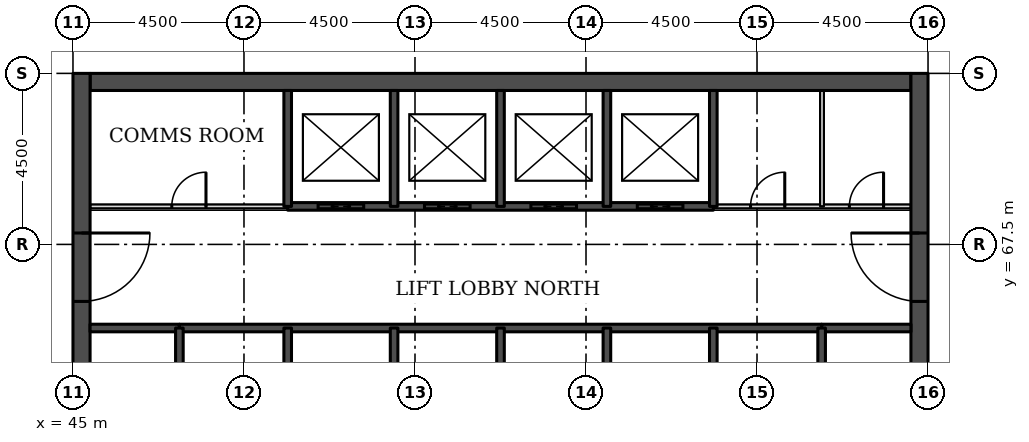
"""IFC4 building model, lengths in metres.
Left out: names, types, materials, properties, quantities, classifications, styles, units other than length and angle.
Written with IfcOpenShell. Run it as: python <this file> out.ifc"""

import sys

from ifc_helpers import new_model, si_unit, direction, frame, frame_2d, origin, place, context, subcontext, project, spatial, rectangle, extrude, element, fill, save


model = new_model("IFC4")
c1 = context("Model", 3, precision=1e-05, world=origin(), true_north=direction((0.0, 1.0)))
c2 = subcontext(c1, "Body", "Model", "MODEL_VIEW")
j1 = project(units=[si_unit("LENGTHUNIT", "METRE"), si_unit("PLANEANGLEUNIT", "RADIAN")], contexts=[c1])
p1 = place(None, origin())
s1 = spatial("IfcSite", under=j1, at=p1, CompositionType="ELEMENT")
p2 = place(p1, origin())
s2 = spatial("IfcBuilding", under=s1, at=p2, CompositionType="ELEMENT")
p3 = place(p2, frame((0.0, 0.0, 86.3)))
s3 = spatial("IfcBuildingStorey", under=s2, at=p3, CompositionType="ELEMENT", Elevation=86.3)
p4 = place(p3, frame((45.45, 71.775, 0.0), z_axis=(0.0, 0.0, 1.0), x_axis=(1.0, 0.0, 0.0)))
e1 = element("IfcWall", 1, at=p4, inside=s3, PredefinedType="SHEAR", context=c2, shape_type="SweptSolid", body=[
    extrude(rectangle(XDim=21.6, YDim=0.45, at=frame_2d((10.8, 0.0))), origin(), (0.0, 0.0, 1.0), 3.7),
])
p5 = place(p3, frame((45.225, 49.5, 0.0), z_axis=(0.0, 0.0, 1.0), x_axis=(0.0, 1.0, 0.0)))
e2 = element("IfcWall", 2, at=p5, inside=s3, PredefinedType="SHEAR", context=c2, shape_type="SweptSolid", body=[
    extrude(rectangle(XDim=22.5, YDim=0.45, at=frame_2d((11.25, 0.0))), origin(), (0.0, 0.0, 1.0), 3.7),
])
p6 = place(p5, frame((4.2, 0.0, 0.0)))
e3 = element("IfcOpeningElement", 3, at=p6, cuts=e2, PredefinedType="OPENING", context=c2, shape_type="SweptSolid", body=[
    extrude(rectangle(XDim=1.8, YDim=2.1, at=frame_2d((0.9, 1.05))), frame((0.0, 0.235, 0.0), z_axis=(0.0, -1.0, 0.0), x_axis=(1.0, 0.0, 0.0)), (0.0, 0.0, 1.0), 0.47),
])
p7 = place(p5, frame((6.9, 0.0, 0.0)))
e4 = element("IfcOpeningElement", 4, at=p7, cuts=e2, PredefinedType="OPENING", context=c2, shape_type="SweptSolid", body=[
    extrude(rectangle(XDim=1.1, YDim=2.1, at=frame_2d((0.55, 1.05))), frame((0.0, 0.235, 0.0), z_axis=(0.0, -1.0, 0.0), x_axis=(1.0, 0.0, 0.0)), (0.0, 0.0, 1.0), 0.47),
])
p8 = place(p5, frame((13.6, 0.0, 0.0)))
e5 = element("IfcOpeningElement", 5, at=p8, cuts=e2, PredefinedType="OPENING", context=c2, shape_type="SweptSolid", body=[
    extrude(rectangle(XDim=1.1, YDim=2.1, at=frame_2d((0.55, 1.05))), frame((0.0, 0.235, 0.0), z_axis=(0.0, -1.0, 0.0), x_axis=(1.0, 0.0, 0.0)), (0.0, 0.0, 1.0), 0.47),
])
p9 = place(p5, frame((16.5, 0.0, 0.0)))
e6 = element("IfcOpeningElement", 6, at=p9, cuts=e2, PredefinedType="OPENING", context=c2, shape_type="SweptSolid", body=[
    extrude(rectangle(XDim=1.8, YDim=2.1, at=frame_2d((0.9, 1.05))), frame((0.0, 0.235, 0.0), z_axis=(0.0, -1.0, 0.0), x_axis=(1.0, 0.0, 0.0)), (0.0, 0.0, 1.0), 0.47),
])
p10 = place(p3, frame((67.275, 49.5, 0.0), z_axis=(0.0, 0.0, 1.0), x_axis=(0.0, 1.0, 0.0)))
e7 = element("IfcWall", 7, at=p10, inside=s3, PredefinedType="SHEAR", context=c2, shape_type="SweptSolid", body=[
    extrude(rectangle(XDim=22.5, YDim=0.45, at=frame_2d((11.25, 0.0))), origin(), (0.0, 0.0, 1.0), 3.7),
])
p11 = place(p10, frame((4.2, 0.0, 0.0)))
e8 = element("IfcOpeningElement", 8, at=p11, cuts=e7, PredefinedType="OPENING", context=c2, shape_type="SweptSolid", body=[
    extrude(rectangle(XDim=1.8, YDim=2.1, at=frame_2d((0.9, 1.05))), frame((0.0, 0.235, 0.0), z_axis=(0.0, -1.0, 0.0), x_axis=(1.0, 0.0, 0.0)), (0.0, 0.0, 1.0), 0.47),
])
p12 = place(p10, frame((6.9, 0.0, 0.0)))
e9 = element("IfcOpeningElement", 9, at=p12, cuts=e7, PredefinedType="OPENING", context=c2, shape_type="SweptSolid", body=[
    extrude(rectangle(XDim=1.1, YDim=2.1, at=frame_2d((0.55, 1.05))), frame((0.0, 0.235, 0.0), z_axis=(0.0, -1.0, 0.0), x_axis=(1.0, 0.0, 0.0)), (0.0, 0.0, 1.0), 0.47),
])
p13 = place(p10, frame((13.6, 0.0, 0.0)))
e10 = element("IfcOpeningElement", 10, at=p13, cuts=e7, PredefinedType="OPENING", context=c2, shape_type="SweptSolid", body=[
    extrude(rectangle(XDim=1.1, YDim=2.1, at=frame_2d((0.55, 1.05))), frame((0.0, 0.235, 0.0), z_axis=(0.0, -1.0, 0.0), x_axis=(1.0, 0.0, 0.0)), (0.0, 0.0, 1.0), 0.47),
])
p14 = place(p10, frame((16.5, 0.0, 0.0)))
e11 = element("IfcOpeningElement", 11, at=p14, cuts=e7, PredefinedType="OPENING", context=c2, shape_type="SweptSolid", body=[
    extrude(rectangle(XDim=1.8, YDim=2.1, at=frame_2d((0.9, 1.05))), frame((0.0, 0.235, 0.0), z_axis=(0.0, -1.0, 0.0), x_axis=(1.0, 0.0, 0.0)), (0.0, 0.0, 1.0), 0.47),
])
for number, where, z_axis, x_axis in (
    (12, (45.45, 65.3, 0.0), (0.0, 0.0, 1.0), (1.0, 0.0, 0.0)),
    (13, (64.7, 65.3, 0.0), (0.0, 0.0, 1.0), (1.0, 0.0, 0.0)),
):
    element("IfcWall", number, at=place(p3, frame(where, z_axis=z_axis, x_axis=x_axis)), inside=s3, PredefinedType="SOLIDWALL", context=c2, shape_type="SweptSolid", body=[
        extrude(rectangle(XDim=2.35, YDim=0.2, at=frame_2d((1.175, 0.0))), origin(), (0.0, 0.0, 1.0), 3.55),
    ])
p15 = place(p3, frame((47.8, 65.3, 0.0), z_axis=(0.0, 0.0, 1.0), x_axis=(1.0, 0.0, 0.0)))
e14 = element("IfcWall", 14, at=p15, inside=s3, PredefinedType="SOLIDWALL", context=c2, shape_type="SweptSolid", body=[
    extrude(rectangle(XDim=16.9, YDim=0.2, at=frame_2d((8.45, 0.0))), origin(), (0.0, 0.0, 1.0), 3.55),
])
p16 = place(p3, frame((45.45, 68.5, 0.0), z_axis=(0.0, 0.0, 1.0), x_axis=(1.0, 0.0, 0.0)))
e15 = element("IfcWall", 15, at=p16, inside=s3, PredefinedType="PARTITIONING", context=c2, shape_type="SweptSolid", body=[
    extrude(rectangle(XDim=5.2, YDim=0.1, at=frame_2d((2.6, 0.0))), origin(), (0.0, 0.0, 1.0), 3.55),
])
p17 = place(p16, frame((2.15, 0.0, 0.0)))
e16 = element("IfcOpeningElement", 16, at=p17, cuts=e15, PredefinedType="OPENING", context=c2, shape_type="SweptSolid", body=[
    extrude(rectangle(XDim=0.9, YDim=2.1, at=frame_2d((0.45, 1.05))), frame((0.0, 0.06, 0.0), z_axis=(0.0, -1.0, 0.0), x_axis=(1.0, 0.0, 0.0)), (0.0, 0.0, 1.0), 0.12),
])
p18 = place(p3, frame((61.85, 68.5, 0.0), z_axis=(0.0, 0.0, 1.0), x_axis=(1.0, 0.0, 0.0)))
e17 = element("IfcWall", 17, at=p18, inside=s3, PredefinedType="PARTITIONING", context=c2, shape_type="SweptSolid", body=[
    extrude(rectangle(XDim=5.2, YDim=0.1, at=frame_2d((2.6, 0.0))), origin(), (0.0, 0.0, 1.0), 3.55),
])
p19 = place(p18, frame((3.58, 0.0, 0.0)))
e18 = element("IfcOpeningElement", 18, at=p19, cuts=e17, PredefinedType="OPENING", context=c2, shape_type="SweptSolid", body=[
    extrude(rectangle(XDim=0.9, YDim=2.1, at=frame_2d((0.45, 1.05))), frame((0.0, 0.06, 0.0), z_axis=(0.0, -1.0, 0.0), x_axis=(1.0, 0.0, 0.0)), (0.0, 0.0, 1.0), 0.12),
])
p20 = place(p18, frame((0.98, 0.0, 0.0)))
e19 = element("IfcOpeningElement", 19, at=p20, cuts=e17, PredefinedType="OPENING", context=c2, shape_type="SweptSolid", body=[
    extrude(rectangle(XDim=0.9, YDim=2.1, at=frame_2d((0.45, 1.05))), frame((0.0, 0.06, 0.0), z_axis=(0.0, -1.0, 0.0), x_axis=(1.0, 0.0, 0.0)), (0.0, 0.0, 1.0), 0.12),
])
p21 = place(p3, frame((50.65, 68.5, 0.0), z_axis=(0.0, 0.0, 1.0), x_axis=(1.0, 0.0, 0.0)))
e20 = element("IfcWall", 20, at=p21, inside=s3, PredefinedType="SOLIDWALL", context=c2, shape_type="SweptSolid", body=[
    extrude(rectangle(XDim=11.2, YDim=0.2, at=frame_2d((5.6, 0.0))), origin(), (0.0, 0.0, 1.0), 3.55),
])
p22 = place(p21, frame((0.8, 0.0, 0.0)))
e21 = element("IfcOpeningElement", 21, at=p22, cuts=e20, PredefinedType="OPENING", context=c2, shape_type="SweptSolid", body=[
    extrude(rectangle(XDim=1.2, YDim=2.1, at=frame_2d((0.6, 1.05))), frame((0.0, 0.11, 0.0), z_axis=(0.0, -1.0, 0.0), x_axis=(1.0, 0.0, 0.0)), (0.0, 0.0, 1.0), 0.22),
])
p23 = place(p21, frame((3.6, 0.0, 0.0)))
e22 = element("IfcOpeningElement", 22, at=p23, cuts=e20, PredefinedType="OPENING", context=c2, shape_type="SweptSolid", body=[
    extrude(rectangle(XDim=1.2, YDim=2.1, at=frame_2d((0.6, 1.05))), frame((0.0, 0.11, 0.0), z_axis=(0.0, -1.0, 0.0), x_axis=(1.0, 0.0, 0.0)), (0.0, 0.0, 1.0), 0.22),
])
p24 = place(p21, frame((6.4, 0.0, 0.0)))
e23 = element("IfcOpeningElement", 23, at=p24, cuts=e20, PredefinedType="OPENING", context=c2, shape_type="SweptSolid", body=[
    extrude(rectangle(XDim=1.2, YDim=2.1, at=frame_2d((0.6, 1.05))), frame((0.0, 0.11, 0.0), z_axis=(0.0, -1.0, 0.0), x_axis=(1.0, 0.0, 0.0)), (0.0, 0.0, 1.0), 0.22),
])
p25 = place(p21, frame((9.2, 0.0, 0.0)))
e24 = element("IfcOpeningElement", 24, at=p25, cuts=e20, PredefinedType="OPENING", context=c2, shape_type="SweptSolid", body=[
    extrude(rectangle(XDim=1.2, YDim=2.1, at=frame_2d((0.6, 1.05))), frame((0.0, 0.11, 0.0), z_axis=(0.0, -1.0, 0.0), x_axis=(1.0, 0.0, 0.0)), (0.0, 0.0, 1.0), 0.22),
])
p26 = place(p3, frame((47.8, 62.0, 0.0), z_axis=(0.0, 0.0, 1.0), x_axis=(0.0, 1.0, 0.0)))
e25 = element("IfcWall", 25, at=p26, inside=s3, PredefinedType="SOLIDWALL", context=c2, shape_type="SweptSolid", body=[
    extrude(rectangle(XDim=3.3, YDim=0.2, at=frame_2d((1.65, 0.0))), origin(), (0.0, 0.0, 1.0), 3.55),
])
p27 = place(p26, frame((1.1, 0.0, 0.0)))
e26 = element("IfcOpeningElement", 26, at=p27, cuts=e25, PredefinedType="OPENING", context=c2, shape_type="SweptSolid", body=[
    extrude(rectangle(XDim=1.1, YDim=2.1, at=frame_2d((0.55, 1.05))), frame((0.0, 0.11, 0.0), z_axis=(0.0, -1.0, 0.0), x_axis=(1.0, 0.0, 0.0)), (0.0, 0.0, 1.0), 0.22),
])
p28 = place(p3, frame((50.65, 62.0, 0.0), z_axis=(0.0, 0.0, 1.0), x_axis=(0.0, 1.0, 0.0)))
e27 = element("IfcWall", 27, at=p28, inside=s3, PredefinedType="SOLIDWALL", context=c2, shape_type="SweptSolid", body=[
    extrude(rectangle(XDim=3.3, YDim=0.2, at=frame_2d((1.65, 0.0))), origin(), (0.0, 0.0, 1.0), 3.55),
])
p29 = place(p3, frame((50.65, 68.5, 0.0), z_axis=(0.0, 0.0, 1.0), x_axis=(0.0, 1.0, 0.0)))
e28 = element("IfcWall", 28, at=p29, inside=s3, PredefinedType="SOLIDWALL", context=c2, shape_type="SweptSolid", body=[
    extrude(rectangle(XDim=3.05, YDim=0.2, at=frame_2d((1.525, 0.0))), origin(), (0.0, 0.0, 1.0), 3.55),
])
p30 = place(p3, frame((53.45, 62.5, 0.0), z_axis=(0.0, 0.0, 1.0), x_axis=(0.0, 1.0, 0.0)))
e29 = element("IfcWall", 29, at=p30, inside=s3, PredefinedType="SOLIDWALL", context=c2, shape_type="SweptSolid", body=[
    extrude(rectangle(XDim=2.8, YDim=0.2, at=frame_2d((1.4, 0.0))), origin(), (0.0, 0.0, 1.0), 3.55),
])
p31 = place(p3, frame((53.45, 68.5, 0.0), z_axis=(0.0, 0.0, 1.0), x_axis=(0.0, 1.0, 0.0)))
e30 = element("IfcWall", 30, at=p31, inside=s3, PredefinedType="SOLIDWALL", context=c2, shape_type="SweptSolid", body=[
    extrude(rectangle(XDim=3.05, YDim=0.2, at=frame_2d((1.525, 0.0))), origin(), (0.0, 0.0, 1.0), 3.55),
])
p32 = place(p3, frame((56.25, 62.5, 0.0), z_axis=(0.0, 0.0, 1.0), x_axis=(0.0, 1.0, 0.0)))
e31 = element("IfcWall", 31, at=p32, inside=s3, PredefinedType="SOLIDWALL", context=c2, shape_type="SweptSolid", body=[
    extrude(rectangle(XDim=2.8, YDim=0.2, at=frame_2d((1.4, 0.0))), origin(), (0.0, 0.0, 1.0), 3.55),
])
p33 = place(p3, frame((56.25, 68.5, 0.0), z_axis=(0.0, 0.0, 1.0), x_axis=(0.0, 1.0, 0.0)))
e32 = element("IfcWall", 32, at=p33, inside=s3, PredefinedType="SOLIDWALL", context=c2, shape_type="SweptSolid", body=[
    extrude(rectangle(XDim=3.05, YDim=0.2, at=frame_2d((1.525, 0.0))), origin(), (0.0, 0.0, 1.0), 3.55),
])
p34 = place(p3, frame((59.05, 62.5, 0.0), z_axis=(0.0, 0.0, 1.0), x_axis=(0.0, 1.0, 0.0)))
e33 = element("IfcWall", 33, at=p34, inside=s3, PredefinedType="SOLIDWALL", context=c2, shape_type="SweptSolid", body=[
    extrude(rectangle(XDim=2.8, YDim=0.2, at=frame_2d((1.4, 0.0))), origin(), (0.0, 0.0, 1.0), 3.55),
])
p35 = place(p3, frame((59.05, 68.5, 0.0), z_axis=(0.0, 0.0, 1.0), x_axis=(0.0, 1.0, 0.0)))
e34 = element("IfcWall", 34, at=p35, inside=s3, PredefinedType="SOLIDWALL", context=c2, shape_type="SweptSolid", body=[
    extrude(rectangle(XDim=3.05, YDim=0.2, at=frame_2d((1.525, 0.0))), origin(), (0.0, 0.0, 1.0), 3.55),
])
p36 = place(p3, frame((61.85, 62.0, 0.0), z_axis=(0.0, 0.0, 1.0), x_axis=(0.0, 1.0, 0.0)))
e35 = element("IfcWall", 35, at=p36, inside=s3, PredefinedType="SOLIDWALL", context=c2, shape_type="SweptSolid", body=[
    extrude(rectangle(XDim=3.3, YDim=0.2, at=frame_2d((1.65, 0.0))), origin(), (0.0, 0.0, 1.0), 3.55),
])
p37 = place(p3, frame((61.85, 68.5, 0.0), z_axis=(0.0, 0.0, 1.0), x_axis=(0.0, 1.0, 0.0)))
e36 = element("IfcWall", 36, at=p37, inside=s3, PredefinedType="SOLIDWALL", context=c2, shape_type="SweptSolid", body=[
    extrude(rectangle(XDim=3.05, YDim=0.2, at=frame_2d((1.525, 0.0))), origin(), (0.0, 0.0, 1.0), 3.55),
])
p38 = place(p3, frame((64.7, 62.0, 0.0), z_axis=(0.0, 0.0, 1.0), x_axis=(0.0, 1.0, 0.0)))
e37 = element("IfcWall", 37, at=p38, inside=s3, PredefinedType="SOLIDWALL", context=c2, shape_type="SweptSolid", body=[
    extrude(rectangle(XDim=3.3, YDim=0.2, at=frame_2d((1.65, 0.0))), origin(), (0.0, 0.0, 1.0), 3.55),
])
p39 = place(p38, frame((1.1, 0.0, 0.0)))
e38 = element("IfcOpeningElement", 38, at=p39, cuts=e37, PredefinedType="OPENING", context=c2, shape_type="SweptSolid", body=[
    extrude(rectangle(XDim=1.1, YDim=2.1, at=frame_2d((0.55, 1.05))), frame((0.0, 0.11, 0.0), z_axis=(0.0, -1.0, 0.0), x_axis=(1.0, 0.0, 0.0)), (0.0, 0.0, 1.0), 0.22),
])
p40 = place(p3, frame((64.71, 68.5, 0.0), z_axis=(0.0, 0.0, 1.0), x_axis=(0.0, 1.0, 0.0)))
e39 = element("IfcWall", 39, at=p40, inside=s3, PredefinedType="PARTITIONING", context=c2, shape_type="SweptSolid", body=[
    extrude(rectangle(XDim=3.05, YDim=0.1, at=frame_2d((1.525, 0.0))), origin(), (0.0, 0.0, 1.0), 3.55),
])
p41 = place(p22, origin())
e40 = element("IfcDoor", 40, at=p41, inside=s3, OperationType="DOUBLE_DOOR_SLIDING", PredefinedType="DOOR", context=c2, shape_type="SweptSolid", body=[
    extrude(rectangle(XDim=1.2, YDim=2.1, at=frame_2d((0.6, 1.05))), frame((0.0, 0.025, 0.0), z_axis=(0.0, -1.0, 0.0), x_axis=(1.0, 0.0, 0.0)), (0.0, 0.0, 1.0), 0.05),
])
fill(e21, e40)
p42 = place(p23, origin())
e41 = element("IfcDoor", 41, at=p42, inside=s3, OperationType="DOUBLE_DOOR_SLIDING", PredefinedType="DOOR", context=c2, shape_type="SweptSolid", body=[
    extrude(rectangle(XDim=1.2, YDim=2.1, at=frame_2d((0.6, 1.05))), frame((0.0, 0.025, 0.0), z_axis=(0.0, -1.0, 0.0), x_axis=(1.0, 0.0, 0.0)), (0.0, 0.0, 1.0), 0.05),
])
fill(e22, e41)
p43 = place(p24, origin())
e42 = element("IfcDoor", 42, at=p43, inside=s3, OperationType="DOUBLE_DOOR_SLIDING", PredefinedType="DOOR", context=c2, shape_type="SweptSolid", body=[
    extrude(rectangle(XDim=1.2, YDim=2.1, at=frame_2d((0.6, 1.05))), frame((0.0, 0.025, 0.0), z_axis=(0.0, -1.0, 0.0), x_axis=(1.0, 0.0, 0.0)), (0.0, 0.0, 1.0), 0.05),
])
fill(e23, e42)
p44 = place(p25, origin())
e43 = element("IfcDoor", 43, at=p44, inside=s3, OperationType="DOUBLE_DOOR_SLIDING", PredefinedType="DOOR", context=c2, shape_type="SweptSolid", body=[
    extrude(rectangle(XDim=1.2, YDim=2.1, at=frame_2d((0.6, 1.05))), frame((0.0, 0.025, 0.0), z_axis=(0.0, -1.0, 0.0), x_axis=(1.0, 0.0, 0.0)), (0.0, 0.0, 1.0), 0.05),
])
fill(e24, e43)
p45 = place(p9, frame((1.8, 0.0, 0.0), z_axis=(0.0, 0.0, 1.0), x_axis=(-1.0, 0.0, 0.0)))
e44 = element("IfcDoor", 44, at=p45, inside=s3, OperationType="SINGLE_SWING_LEFT", PredefinedType="DOOR", context=c2, shape_type="SweptSolid", body=[
    extrude(rectangle(XDim=1.8, YDim=2.1, at=frame_2d((0.9, 1.05))), frame((0.0, 0.025, 0.0), z_axis=(0.0, -1.0, 0.0), x_axis=(1.0, 0.0, 0.0)), (0.0, 0.0, 1.0), 0.05),
])
fill(e6, e44)
p46 = place(p14, origin())
e45 = element("IfcDoor", 45, at=p46, inside=s3, OperationType="SINGLE_SWING_RIGHT", PredefinedType="DOOR", context=c2, shape_type="SweptSolid", body=[
    extrude(rectangle(XDim=1.8, YDim=2.1, at=frame_2d((0.9, 1.05))), frame((0.0, 0.025, 0.0), z_axis=(0.0, -1.0, 0.0), x_axis=(1.0, 0.0, 0.0)), (0.0, 0.0, 1.0), 0.05),
])
fill(e11, e45)
p47 = place(p19, origin())
e46 = element("IfcDoor", 46, at=p47, inside=s3, OperationType="SINGLE_SWING_RIGHT", PredefinedType="DOOR", context=c2, shape_type="SweptSolid", body=[
    extrude(rectangle(XDim=0.9, YDim=2.1, at=frame_2d((0.45, 1.05))), frame((0.0, 0.025, 0.0), z_axis=(0.0, -1.0, 0.0), x_axis=(1.0, 0.0, 0.0)), (0.0, 0.0, 1.0), 0.05),
])
fill(e18, e46)
p48 = place(p20, origin())
e47 = element("IfcDoor", 47, at=p48, inside=s3, OperationType="SINGLE_SWING_RIGHT", PredefinedType="DOOR", context=c2, shape_type="SweptSolid", body=[
    extrude(rectangle(XDim=0.9, YDim=2.1, at=frame_2d((0.45, 1.05))), frame((0.0, 0.025, 0.0), z_axis=(0.0, -1.0, 0.0), x_axis=(1.0, 0.0, 0.0)), (0.0, 0.0, 1.0), 0.05),
])
fill(e19, e47)
p49 = place(p17, origin())
e48 = element("IfcDoor", 48, at=p49, inside=s3, OperationType="SINGLE_SWING_RIGHT", PredefinedType="DOOR", context=c2, shape_type="SweptSolid", body=[
    extrude(rectangle(XDim=0.9, YDim=2.1, at=frame_2d((0.45, 1.05))), frame((0.0, 0.025, 0.0), z_axis=(0.0, -1.0, 0.0), x_axis=(1.0, 0.0, 0.0)), (0.0, 0.0, 1.0), 0.05),
])
fill(e16, e48)
save(model, sys.argv[1])
